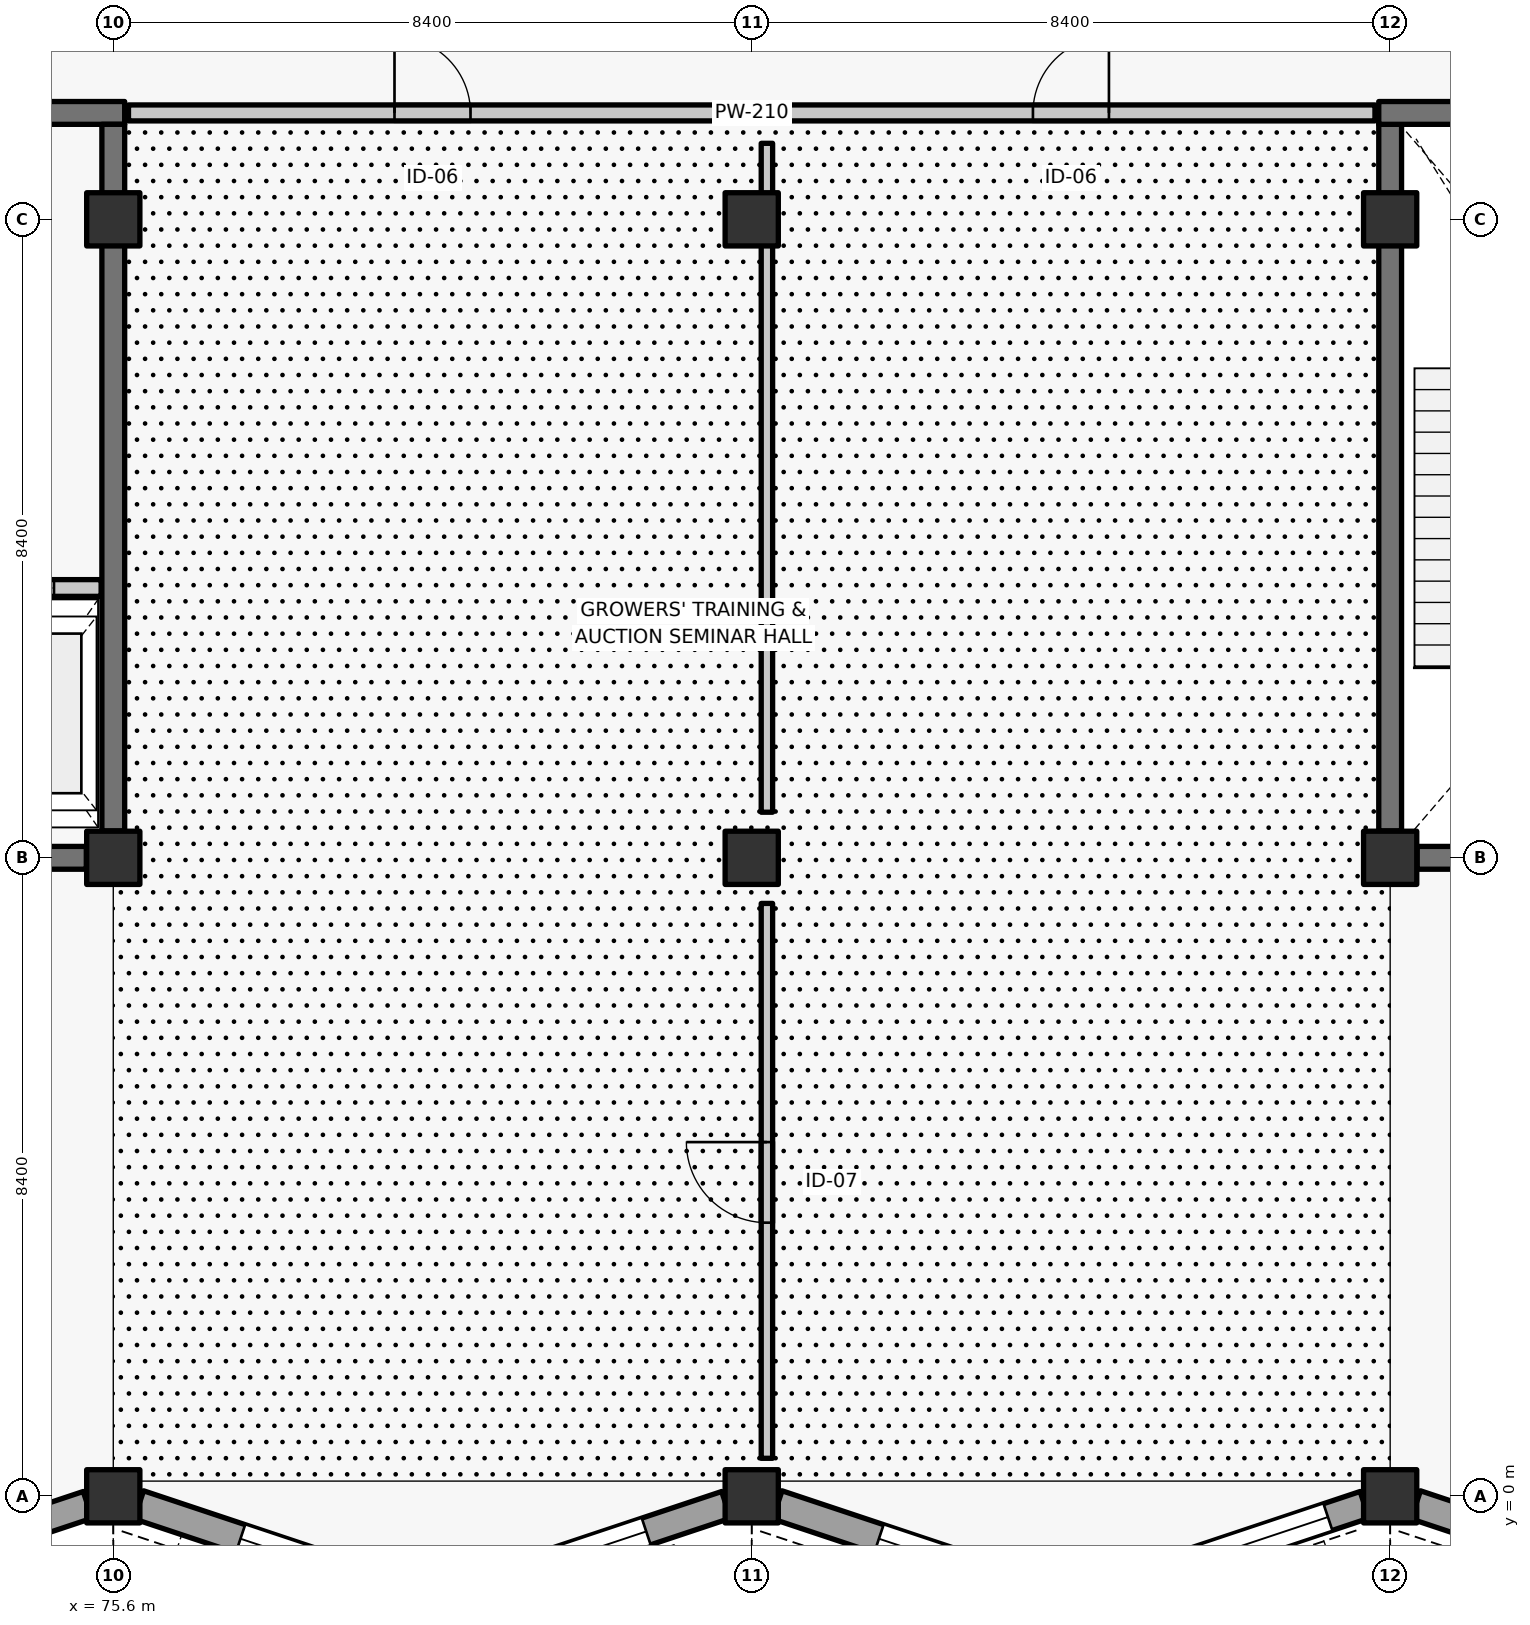
"""IFC4 building model, lengths in metres.
Left out: names, types, materials, properties, quantities, classifications, styles, units other than length and angle.
Written with IfcOpenShell. Run it as: python <this file> out.ifc"""

import sys

from ifc_helpers import new_model, si_unit, direction, frame, frame_2d, origin, origin_2d, place, context, subcontext, project, spatial, rectangle, extrude, element, fill, save


model = new_model("IFC4")
c1 = context("Model", 3, precision=1e-05, world=origin(), true_north=direction((0.0, 1.0)))
c2 = subcontext(c1, "Body", "Model", "MODEL_VIEW")
j1 = project(units=[si_unit("LENGTHUNIT", "METRE"), si_unit("PLANEANGLEUNIT", "RADIAN")], contexts=[c1])
p1 = place(None, origin())
s1 = spatial("IfcSite", under=j1, at=p1, CompositionType="ELEMENT")
p2 = place(p1, origin())
s2 = spatial("IfcBuilding", under=s1, at=p2, CompositionType="ELEMENT")
p3 = place(p2, frame((0.0, 0.0, 11.4)))
s3 = spatial("IfcBuildingStorey", under=s2, at=p3, CompositionType="ELEMENT", Elevation=11.4)
for number, where, z_axis, x_axis in (
    (1, (75.6, 0.0, 0.0), (0.0, 0.0, 1.0), (1.0, 0.0, 0.0)),
    (2, (75.6, 8.4, 0.0), (0.0, 0.0, 1.0), (1.0, 0.0, 0.0)),
    (3, (75.6, 16.8, 0.0), (0.0, 0.0, 1.0), (1.0, 0.0, 0.0)),
    (4, (84.0, 0.0, 0.0), (0.0, 0.0, 1.0), (1.0, 0.0, 0.0)),
    (5, (84.0, 8.4, 0.0), (0.0, 0.0, 1.0), (1.0, 0.0, 0.0)),
    (6, (84.0, 16.8, 0.0), (0.0, 0.0, 1.0), (1.0, 0.0, 0.0)),
    (7, (92.4, 0.0, 0.0), (0.0, 0.0, 1.0), (1.0, 0.0, 0.0)),
    (8, (92.4, 8.4, 0.0), (0.0, 0.0, 1.0), (1.0, 0.0, 0.0)),
    (9, (92.4, 16.8, 0.0), (0.0, 0.0, 1.0), (1.0, 0.0, 0.0)),
):
    element("IfcColumn", number, at=place(p3, frame(where, z_axis=z_axis, x_axis=x_axis)), inside=s3, PredefinedType="COLUMN", context=c2, shape_type="SweptSolid", body=[
        extrude(rectangle(XDim=0.7, YDim=0.7, at=origin_2d()), origin(), (0.0, 0.0, 1.0), 4.8),
    ])
p4 = place(p3, frame((75.263, -0.112, 0.0), z_axis=(0.0, 0.0, 1.0), x_axis=(-0.948695287956, -0.316191794027, 0.0)))
e10 = element("IfcWall", 10, at=p4, inside=s3, PredefinedType="SOLIDWALL", context=c2, shape_type="SweptSolid", body=[
    extrude(rectangle(XDim=4.072, YDim=0.37, at=frame_2d((2.036, 0.0))), origin(), (0.0, 0.0, 1.0), 4.52),
])
p5 = place(p4, frame((0.998, 0.0, 0.9)))
e11 = element("IfcOpeningElement", 11, at=p5, cuts=e10, PredefinedType="OPENING", context=c2, shape_type="SweptSolid", body=[
    extrude(rectangle(XDim=1.72, YDim=1.7, at=frame_2d((0.86, 0.85))), frame((0.0, 0.195, 0.0), z_axis=(0.0, -1.0, 0.0), x_axis=(1.0, 0.0, 0.0)), (0.0, 0.0, 1.0), 0.39),
])
p6 = place(p3, frame((79.8, -1.4, 0.0), z_axis=(0.0, 0.0, 1.0), x_axis=(-0.948695287956, 0.316191794027, 0.0)))
e12 = element("IfcWall", 12, at=p6, inside=s3, PredefinedType="SOLIDWALL", context=c2, shape_type="SweptSolid", body=[
    extrude(rectangle(XDim=4.072, YDim=0.39, at=frame_2d((2.036, 0.0))), origin(), (0.0, 0.0, 1.0), 4.52),
])
p7 = place(p6, frame((1.763, 0.0, 0.9)))
e13 = element("IfcOpeningElement", 13, at=p7, cuts=e12, PredefinedType="OPENING", context=c2, shape_type="SweptSolid", body=[
    extrude(rectangle(XDim=0.9, YDim=2.1, at=frame_2d((0.45, 1.05))), frame((0.0, 0.205, 0.0), z_axis=(0.0, -1.0, 0.0), x_axis=(1.0, 0.0, 0.0)), (0.0, 0.0, 1.0), 0.41),
])
p8 = place(p3, frame((83.663, -0.112, 0.0), z_axis=(0.0, 0.0, 1.0), x_axis=(-0.948689293515, -0.316209779056, 0.0)))
e14 = element("IfcWall", 14, at=p8, inside=s3, PredefinedType="SOLIDWALL", context=c2, shape_type="SweptSolid", body=[
    extrude(rectangle(XDim=4.072, YDim=0.37, at=frame_2d((2.036, 0.0))), origin(), (0.0, 0.0, 1.0), 4.52),
])
p9 = place(p8, frame((1.108, 0.0, 0.9)))
e15 = element("IfcOpeningElement", 15, at=p9, cuts=e14, PredefinedType="OPENING", context=c2, shape_type="SweptSolid", body=[
    extrude(rectangle(XDim=1.5, YDim=2.15, at=frame_2d((0.75, 1.075))), frame((0.0, 0.195, 0.0), z_axis=(0.0, -1.0, 0.0), x_axis=(1.0, 0.0, 0.0)), (0.0, 0.0, 1.0), 0.39),
])
p10 = place(p3, frame((88.2, -1.4, 0.0), z_axis=(0.0, 0.0, 1.0), x_axis=(-0.948689293515, 0.316209779056, 0.0)))
e16 = element("IfcWall", 16, at=p10, inside=s3, PredefinedType="SOLIDWALL", context=c2, shape_type="SweptSolid", body=[
    extrude(rectangle(XDim=4.072, YDim=0.39, at=frame_2d((2.036, 0.0))), origin(), (0.0, 0.0, 1.0), 4.52),
])
p11 = place(p10, frame((1.763, 0.0, 0.9)))
e17 = element("IfcOpeningElement", 17, at=p11, cuts=e16, PredefinedType="OPENING", context=c2, shape_type="SweptSolid", body=[
    extrude(rectangle(XDim=0.9, YDim=2.1, at=frame_2d((0.45, 1.05))), frame((0.0, 0.205, 0.0), z_axis=(0.0, -1.0, 0.0), x_axis=(1.0, 0.0, 0.0)), (0.0, 0.0, 1.0), 0.41),
])
p12 = place(p3, frame((92.063, -0.112, 0.0), z_axis=(0.0, 0.0, 1.0), x_axis=(-0.948695287956, -0.316191794027, 0.0)))
e18 = element("IfcWall", 18, at=p12, inside=s3, PredefinedType="SOLIDWALL", context=c2, shape_type="SweptSolid", body=[
    extrude(rectangle(XDim=4.072, YDim=0.37, at=frame_2d((2.036, 0.0))), origin(), (0.0, 0.0, 1.0), 4.52),
])
p13 = place(p12, frame((0.508, 0.0, 0.9)))
e19 = element("IfcOpeningElement", 19, at=p13, cuts=e18, PredefinedType="OPENING", context=c2, shape_type="SweptSolid", body=[
    extrude(rectangle(XDim=2.7, YDim=1.75, at=frame_2d((1.35, 0.875))), frame((0.0, 0.195, 0.0), z_axis=(0.0, -1.0, 0.0), x_axis=(1.0, 0.0, 0.0)), (0.0, 0.0, 1.0), 0.39),
])
p14 = place(p3, frame((96.6, -1.4, 0.0), z_axis=(0.0, 0.0, 1.0), x_axis=(-0.948695287956, 0.316191794027, 0.0)))
e20 = element("IfcWall", 20, at=p14, inside=s3, PredefinedType="SOLIDWALL", context=c2, shape_type="SweptSolid", body=[
    extrude(rectangle(XDim=4.072, YDim=0.39, at=frame_2d((2.036, 0.0))), origin(), (0.0, 0.0, 1.0), 4.52),
])
p15 = place(p14, frame((1.763, 0.0, 0.9)))
e21 = element("IfcOpeningElement", 21, at=p15, cuts=e20, PredefinedType="OPENING", context=c2, shape_type="SweptSolid", body=[
    extrude(rectangle(XDim=0.9, YDim=2.1, at=frame_2d((0.45, 1.05))), frame((0.0, 0.205, 0.0), z_axis=(0.0, -1.0, 0.0), x_axis=(1.0, 0.0, 0.0)), (0.0, 0.0, 1.0), 0.41),
])
p16 = place(p3, frame((75.245, 8.4, 0.0), z_axis=(0.0, 0.0, 1.0), x_axis=(-1.0, 0.0, 0.0)))
e22 = element("IfcWall", 22, at=p16, inside=s3, PredefinedType="SHEAR", context=c2, shape_type="SweptSolid", body=[
    extrude(rectangle(XDim=7.69, YDim=0.3, at=frame_2d((3.845, 0.0))), origin(), (0.0, 0.0, 1.0), 4.52),
])
p17 = place(p3, frame((67.05, 18.2, 0.0), z_axis=(0.0, 0.0, 1.0), x_axis=(1.0, 0.0, 0.0)))
e23 = element("IfcWall", 23, at=p17, inside=s3, PredefinedType="SHEAR", context=c2, shape_type="SweptSolid", body=[
    extrude(rectangle(XDim=8.7, YDim=0.3, at=frame_2d((4.35, 0.0))), origin(), (0.0, 0.0, 1.0), 4.52),
])
p18 = place(p17, frame((5.57, 0.0, 0.0)))
e24 = element("IfcOpeningElement", 24, at=p18, cuts=e23, PredefinedType="OPENING", context=c2, shape_type="SweptSolid", body=[
    extrude(rectangle(XDim=1.96, YDim=2.2, at=frame_2d((0.98, 1.1))), frame((0.0, 0.16, 0.0), z_axis=(0.0, -1.0, 0.0), x_axis=(1.0, 0.0, 0.0)), (0.0, 0.0, 1.0), 0.32),
])
p19 = place(p3, frame((75.6, 18.05, 0.0), z_axis=(0.0, 0.0, 1.0), x_axis=(0.0, -1.0, 0.0)))
e25 = element("IfcWall", 25, at=p19, inside=s3, PredefinedType="SHEAR", context=c2, shape_type="SweptSolid", body=[
    extrude(rectangle(XDim=9.295, YDim=0.3, at=frame_2d((4.647, 0.0))), origin(), (0.0, 0.0, 1.0), 4.52),
])
p20 = place(p3, frame((73.1, 11.95, 0.0), z_axis=(0.0, 0.0, 1.0), x_axis=(1.0, 0.0, 0.0)))
e26 = element("IfcWall", 26, at=p20, inside=s3, PredefinedType="SOLIDWALL", context=c2, shape_type="SweptSolid", body=[
    extrude(rectangle(XDim=2.34, YDim=0.22, at=frame_2d((1.17, 0.0))), origin(), (0.0, 0.0, 1.0), 4.52),
])
p21 = place(p20, frame((0.62, 0.0, 0.0)))
e27 = element("IfcOpeningElement", 27, at=p21, cuts=e26, PredefinedType="OPENING", context=c2, shape_type="SweptSolid", body=[
    extrude(rectangle(XDim=1.1, YDim=2.2, at=frame_2d((0.55, 1.1))), frame((0.0, 0.12, 0.0), z_axis=(0.0, -1.0, 0.0), x_axis=(1.0, 0.0, 0.0)), (0.0, 0.0, 1.0), 0.24),
])
p22 = place(p3, frame((100.445, 8.4, 0.0), z_axis=(0.0, 0.0, 1.0), x_axis=(-1.0, 0.0, 0.0)))
e28 = element("IfcWall", 28, at=p22, inside=s3, PredefinedType="SHEAR", context=c2, shape_type="SweptSolid", body=[
    extrude(rectangle(XDim=7.69, YDim=0.3, at=frame_2d((3.845, 0.0))), origin(), (0.0, 0.0, 1.0), 4.52),
])
p23 = place(p3, frame((92.4, 8.755, 0.0), z_axis=(0.0, 0.0, 1.0), x_axis=(0.0, 1.0, 0.0)))
e29 = element("IfcWall", 29, at=p23, inside=s3, PredefinedType="SHEAR", context=c2, shape_type="SweptSolid", body=[
    extrude(rectangle(XDim=9.295, YDim=0.3, at=frame_2d((4.647, 0.0))), origin(), (0.0, 0.0, 1.0), 4.52),
])
p24 = place(p3, frame((92.25, 18.2, 0.0), z_axis=(0.0, 0.0, 1.0), x_axis=(1.0, 0.0, 0.0)))
e30 = element("IfcWall", 30, at=p24, inside=s3, PredefinedType="SHEAR", context=c2, shape_type="SweptSolid", body=[
    extrude(rectangle(XDim=8.7, YDim=0.3, at=frame_2d((4.35, 0.0))), origin(), (0.0, 0.0, 1.0), 4.52),
])
p25 = place(p24, frame((5.57, 0.0, 0.0)))
e31 = element("IfcOpeningElement", 31, at=p25, cuts=e30, PredefinedType="OPENING", context=c2, shape_type="SweptSolid", body=[
    extrude(rectangle(XDim=1.96, YDim=2.2, at=frame_2d((0.98, 1.1))), frame((0.0, 0.16, 0.0), z_axis=(0.0, -1.0, 0.0), x_axis=(1.0, 0.0, 0.0)), (0.0, 0.0, 1.0), 0.32),
])
p26 = place(p3, frame((75.8, 18.2, 0.0), z_axis=(0.0, 0.0, 1.0), x_axis=(1.0, 0.0, 0.0)))
e32 = element("IfcWall", 32, at=p26, inside=s3, PredefinedType="PARTITIONING", context=c2, shape_type="SweptSolid", body=[
    extrude(rectangle(XDim=16.4, YDim=0.21, at=frame_2d((8.2, 0.0))), origin(), (0.0, 0.0, 1.0), 4.52),
])
p27 = place(p26, frame((3.5, 0.0, 0.0)))
e33 = element("IfcOpeningElement", 33, at=p27, cuts=e32, PredefinedType="OPENING", context=c2, shape_type="SweptSolid", body=[
    extrude(rectangle(XDim=1.0, YDim=2.15, at=frame_2d((0.5, 1.075))), frame((0.0, 0.115, 0.0), z_axis=(0.0, -1.0, 0.0), x_axis=(1.0, 0.0, 0.0)), (0.0, 0.0, 1.0), 0.23),
])
p28 = place(p26, frame((11.9, 0.0, 0.0)))
e34 = element("IfcOpeningElement", 34, at=p28, cuts=e32, PredefinedType="OPENING", context=c2, shape_type="SweptSolid", body=[
    extrude(rectangle(XDim=1.0, YDim=2.15, at=frame_2d((0.5, 1.075))), frame((0.0, 0.115, 0.0), z_axis=(0.0, -1.0, 0.0), x_axis=(1.0, 0.0, 0.0)), (0.0, 0.0, 1.0), 0.23),
])
p29 = place(p3, frame((84.2, 0.5, 0.0), z_axis=(0.0, 0.0, 1.0), x_axis=(0.0, 1.0, 0.0)))
e35 = element("IfcWall", 35, at=p29, inside=s3, PredefinedType="PARTITIONING", context=c2, shape_type="SweptSolid", body=[
    extrude(rectangle(XDim=7.3, YDim=0.15, at=frame_2d((3.65, 0.0))), origin(), (0.0, 0.0, 1.0), 4.52),
])
p30 = place(p29, frame((3.1, 0.0, 0.0)))
e36 = element("IfcOpeningElement", 36, at=p30, cuts=e35, PredefinedType="OPENING", context=c2, shape_type="SweptSolid", body=[
    extrude(rectangle(XDim=1.06, YDim=2.18, at=frame_2d((0.53, 1.09))), frame((0.0, 0.085, 0.0), z_axis=(0.0, -1.0, 0.0), x_axis=(1.0, 0.0, 0.0)), (0.0, 0.0, 1.0), 0.17),
])
p31 = place(p3, frame((84.2, 9.0, 0.0), z_axis=(0.0, 0.0, 1.0), x_axis=(0.0, 1.0, 0.0)))
e37 = element("IfcWall", 37, at=p31, inside=s3, PredefinedType="PARTITIONING", context=c2, shape_type="SweptSolid", body=[
    extrude(rectangle(XDim=8.8, YDim=0.15, at=frame_2d((4.4, 0.0))), origin(), (0.0, 0.0, 1.0), 4.52),
])
p32 = place(p7, origin())
e38 = element("IfcWindow", 38, at=p32, inside=s3, PartitioningType="SINGLE_PANEL", PredefinedType="WINDOW", context=c2, shape_type="SweptSolid", body=[
    extrude(rectangle(XDim=0.9, YDim=2.1, at=frame_2d((0.45, 1.05))), frame((0.0, 0.03, 0.0), z_axis=(0.0, -1.0, 0.0), x_axis=(1.0, 0.0, 0.0)), (0.0, 0.0, 1.0), 0.06),
])
fill(e13, e38)
p33 = place(p9, origin())
e39 = element("IfcWindow", 39, at=p33, inside=s3, PartitioningType="SINGLE_PANEL", PredefinedType="WINDOW", context=c2, shape_type="SweptSolid", body=[
    extrude(rectangle(XDim=1.5, YDim=2.15, at=frame_2d((0.75, 1.075))), frame((0.0, 0.03, 0.0), z_axis=(0.0, -1.0, 0.0), x_axis=(1.0, 0.0, 0.0)), (0.0, 0.0, 1.0), 0.06),
])
fill(e15, e39)
p34 = place(p11, origin())
e40 = element("IfcWindow", 40, at=p34, inside=s3, PartitioningType="SINGLE_PANEL", PredefinedType="WINDOW", context=c2, shape_type="SweptSolid", body=[
    extrude(rectangle(XDim=0.9, YDim=2.1, at=frame_2d((0.45, 1.05))), frame((0.0, 0.03, 0.0), z_axis=(0.0, -1.0, 0.0), x_axis=(1.0, 0.0, 0.0)), (0.0, 0.0, 1.0), 0.06),
])
fill(e17, e40)
p35 = place(p13, origin())
e41 = element("IfcWindow", 41, at=p35, inside=s3, PartitioningType="SINGLE_PANEL", PredefinedType="WINDOW", context=c2, shape_type="SweptSolid", body=[
    extrude(rectangle(XDim=2.7, YDim=1.75, at=frame_2d((1.35, 0.875))), frame((0.0, 0.03, 0.0), z_axis=(0.0, -1.0, 0.0), x_axis=(1.0, 0.0, 0.0)), (0.0, 0.0, 1.0), 0.06),
])
fill(e19, e41)
p36 = place(p21, origin())
e42 = element("IfcDoor", 42, at=p36, inside=s3, OperationType="SLIDING_TO_LEFT", PredefinedType="DOOR", context=c2, shape_type="SweptSolid", body=[
    extrude(rectangle(XDim=1.1, YDim=2.2, at=frame_2d((0.55, 1.1))), frame((0.0, 0.025, 0.0), z_axis=(0.0, -1.0, 0.0), x_axis=(1.0, 0.0, 0.0)), (0.0, 0.0, 1.0), 0.05),
])
fill(e27, e42)
p37 = place(p27, origin())
e43 = element("IfcDoor", 43, at=p37, inside=s3, OperationType="SINGLE_SWING_LEFT", PredefinedType="DOOR", context=c2, shape_type="SweptSolid", body=[
    extrude(rectangle(XDim=1.0, YDim=2.15, at=frame_2d((0.5, 1.075))), frame((0.0, 0.025, 0.0), z_axis=(0.0, -1.0, 0.0), x_axis=(1.0, 0.0, 0.0)), (0.0, 0.0, 1.0), 0.05),
])
fill(e33, e43)
p38 = place(p28, origin())
e44 = element("IfcDoor", 44, at=p38, inside=s3, OperationType="SINGLE_SWING_RIGHT", PredefinedType="DOOR", context=c2, shape_type="SweptSolid", body=[
    extrude(rectangle(XDim=1.0, YDim=2.15, at=frame_2d((0.5, 1.075))), frame((0.0, 0.025, 0.0), z_axis=(0.0, -1.0, 0.0), x_axis=(1.0, 0.0, 0.0)), (0.0, 0.0, 1.0), 0.05),
])
fill(e34, e44)
p39 = place(p30, origin())
e45 = element("IfcDoor", 45, at=p39, inside=s3, OperationType="SINGLE_SWING_RIGHT", PredefinedType="DOOR", context=c2, shape_type="SweptSolid", body=[
    extrude(rectangle(XDim=1.06, YDim=2.18, at=frame_2d((0.53, 1.09))), frame((0.0, 0.025, 0.0), z_axis=(0.0, -1.0, 0.0), x_axis=(1.0, 0.0, 0.0)), (0.0, 0.0, 1.0), 0.05),
])
fill(e36, e45)
save(model, sys.argv[1])
